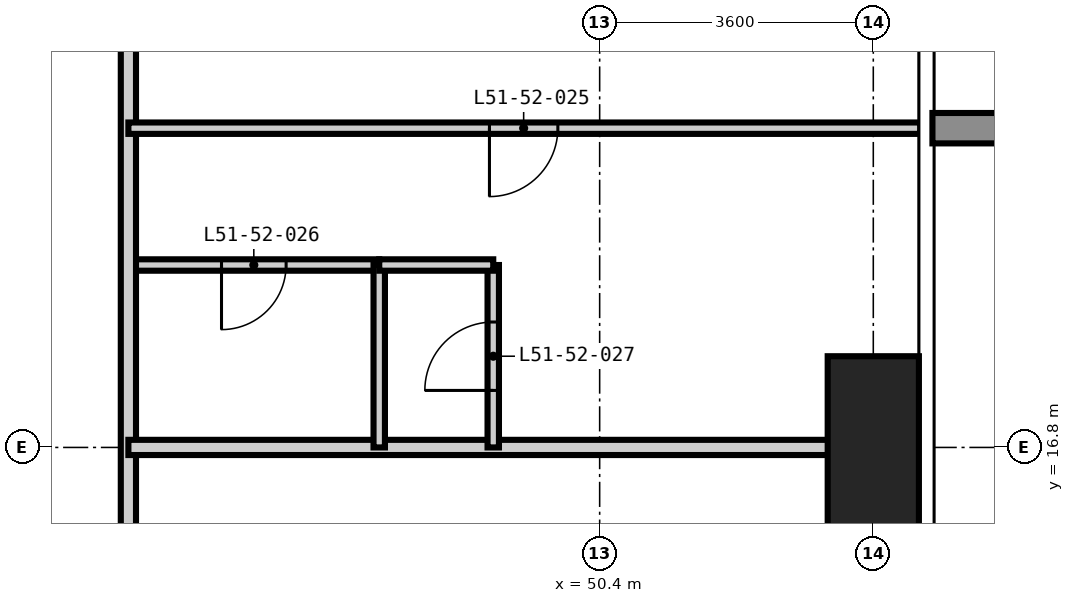
"""IFC4 building model, lengths in metres.
Left out: names, types, materials, properties, quantities, classifications, styles, units other than length and angle.
Written with IfcOpenShell. Run it as: python <this file> out.ifc"""

import sys

from ifc_helpers import new_model, si_unit, direction, frame, frame_2d, origin, origin_2d, place, context, subcontext, project, spatial, rectangle, extrude, element, fill, save


model = new_model("IFC4")
c1 = context("Model", 3, precision=1e-05, world=origin(), true_north=direction((0.0, 1.0)))
c2 = subcontext(c1, "Body", "Model", "MODEL_VIEW")
j1 = project(units=[si_unit("LENGTHUNIT", "METRE"), si_unit("PLANEANGLEUNIT", "RADIAN")], contexts=[c1])
p1 = place(None, origin())
s1 = spatial("IfcSite", under=j1, at=p1, CompositionType="ELEMENT")
p2 = place(p1, origin())
s2 = spatial("IfcBuilding", under=s1, at=p2, CompositionType="ELEMENT")
p3 = place(p2, frame((0.0, 0.0, 198.6)))
s3 = spatial("IfcBuildingStorey", under=s2, at=p3, CompositionType="ELEMENT", Elevation=198.6)
p4 = place(p3, frame((54.0, 16.8, -0.35), z_axis=(0.0, 0.0, 1.0), x_axis=(1.0, 0.0, 0.0)))
e1 = element("IfcColumn", 1, at=p4, inside=s3, PredefinedType="COLUMN", context=c2, shape_type="SweptSolid", body=[
    extrude(rectangle(XDim=1.2, YDim=2.4, at=origin_2d()), origin(), (0.0, 0.0, 1.0), 3.6),
])
p5 = place(p3, frame((44.2, 19.2, 0.0), z_axis=(0.0, 0.0, 1.0), x_axis=(1.0, 0.0, 0.0)))
e2 = element("IfcWall", 2, at=p5, inside=s3, PredefinedType="PARTITIONING", context=c2, shape_type="SweptSolid", body=[
    extrude(rectangle(XDim=3.3, YDim=0.15, at=frame_2d((1.65, 0.0))), origin(), (0.0, 0.0, 1.0), 3.25),
])
p6 = place(p5, frame((1.225, 0.0, 0.0)))
e3 = element("IfcOpeningElement", 3, at=p6, cuts=e2, PredefinedType="OPENING", context=c2, shape_type="SweptSolid", body=[
    extrude(rectangle(XDim=0.85, YDim=2.1, at=frame_2d((0.425, 1.05))), frame((0.0, 0.085, 0.0), z_axis=(0.0, -1.0, 0.0), x_axis=(1.0, 0.0, 0.0)), (0.0, 0.0, 1.0), 0.17),
])
p7 = place(p3, frame((44.2, 44.8, 0.0), z_axis=(0.0, 0.0, 1.0), x_axis=(0.0, -1.0, 0.0)))
e4 = element("IfcWall", 4, at=p7, inside=s3, PredefinedType="PARTITIONING", context=c2, shape_type="SweptSolid", body=[
    extrude(rectangle(XDim=31.4, YDim=0.2, at=frame_2d((15.7, 0.0))), origin(), (0.0, 0.0, 1.0), 3.25),
])
p8 = place(p7, frame((21.2, 0.0, 0.0)))
e5 = element("IfcOpeningElement", 5, at=p8, cuts=e4, PredefinedType="OPENING", context=c2, shape_type="SweptSolid", body=[
    extrude(rectangle(XDim=1.0, YDim=2.2, at=frame_2d((0.5, 1.1))), frame((0.0, 0.11, 0.0), z_axis=(0.0, -1.0, 0.0), x_axis=(1.0, 0.0, 0.0)), (0.0, 0.0, 1.0), 0.22),
])
p9 = place(p7, frame((8.6, 0.0, 0.0)))
e6 = element("IfcOpeningElement", 6, at=p9, cuts=e4, PredefinedType="OPENING", context=c2, shape_type="SweptSolid", body=[
    extrude(rectangle(XDim=1.0, YDim=2.2, at=frame_2d((0.5, 1.1))), frame((0.0, 0.11, 0.0), z_axis=(0.0, -1.0, 0.0), x_axis=(1.0, 0.0, 0.0)), (0.0, 0.0, 1.0), 0.22),
])
p10 = place(p7, frame((29.2, 0.0, 0.0)))
e7 = element("IfcOpeningElement", 7, at=p10, cuts=e4, PredefinedType="OPENING", context=c2, shape_type="SweptSolid", body=[
    extrude(rectangle(XDim=1.0, YDim=2.2, at=frame_2d((0.5, 1.1))), frame((0.0, 0.11, 0.0), z_axis=(0.0, -1.0, 0.0), x_axis=(1.0, 0.0, 0.0)), (0.0, 0.0, 1.0), 0.22),
])
p11 = place(p7, frame((0.9, 0.0, 0.0)))
e8 = element("IfcOpeningElement", 8, at=p11, cuts=e4, PredefinedType="OPENING", context=c2, shape_type="SweptSolid", body=[
    extrude(rectangle(XDim=1.0, YDim=2.2, at=frame_2d((0.5, 1.1))), frame((0.0, 0.11, 0.0), z_axis=(0.0, -1.0, 0.0), x_axis=(1.0, 0.0, 0.0)), (0.0, 0.0, 1.0), 0.22),
])
p12 = place(p3, frame((44.2, 16.8, 0.0), z_axis=(0.0, 0.0, 1.0), x_axis=(1.0, 0.0, 0.0)))
e9 = element("IfcWall", 9, at=p12, inside=s3, PredefinedType="PARTITIONING", context=c2, shape_type="SweptSolid", body=[
    extrude(rectangle(XDim=10.418, YDim=0.2, at=frame_2d((5.209, 0.0))), origin(), (0.0, 0.0, 1.0), 3.25),
])
p13 = place(p3, frame((47.5, 16.8, 0.0), z_axis=(0.0, 0.0, 1.0), x_axis=(0.0, 1.0, 0.0)))
e10 = element("IfcWall", 10, at=p13, inside=s3, PredefinedType="PARTITIONING", context=c2, shape_type="SweptSolid", body=[
    extrude(rectangle(XDim=2.4, YDim=0.15, at=frame_2d((1.2, 0.0))), origin(), (0.0, 0.0, 1.0), 3.25),
])
p14 = place(p3, frame((49.0, 16.8, 0.0), z_axis=(0.0, 0.0, 1.0), x_axis=(0.0, 1.0, 0.0)))
e11 = element("IfcWall", 11, at=p14, inside=s3, PredefinedType="PARTITIONING", context=c2, shape_type="SweptSolid", body=[
    extrude(rectangle(XDim=2.4, YDim=0.15, at=frame_2d((1.2, 0.0))), origin(), (0.0, 0.0, 1.0), 3.25),
])
p15 = place(p14, frame((0.75, 0.0, 0.0)))
e12 = element("IfcOpeningElement", 12, at=p15, cuts=e11, PredefinedType="OPENING", context=c2, shape_type="SweptSolid", body=[
    extrude(rectangle(XDim=0.9, YDim=2.1, at=frame_2d((0.45, 1.05))), frame((0.0, 0.085, 0.0), z_axis=(0.0, -1.0, 0.0), x_axis=(1.0, 0.0, 0.0)), (0.0, 0.0, 1.0), 0.17),
])
p16 = place(p3, frame((47.5, 19.2, 0.0), z_axis=(0.0, 0.0, 1.0), x_axis=(1.0, 0.0, 0.0)))
e13 = element("IfcWall", 13, at=p16, inside=s3, PredefinedType="PARTITIONING", context=c2, shape_type="SweptSolid", body=[
    extrude(rectangle(XDim=1.5, YDim=0.15, at=frame_2d((0.75, 0.0))), origin(), (0.0, 0.0, 1.0), 3.25),
])
p17 = place(p3, frame((44.2, 21.0, 0.0), z_axis=(0.0, 0.0, 1.0), x_axis=(1.0, 0.0, 0.0)))
e14 = element("IfcWall", 14, at=p17, inside=s3, PredefinedType="PARTITIONING", context=c2, shape_type="SweptSolid", body=[
    extrude(rectangle(XDim=10.418, YDim=0.15, at=frame_2d((5.209, 0.0))), origin(), (0.0, 0.0, 1.0), 3.25),
])
p18 = place(p17, frame((4.75, 0.0, 0.0)))
e15 = element("IfcOpeningElement", 15, at=p18, cuts=e14, PredefinedType="OPENING", context=c2, shape_type="SweptSolid", body=[
    extrude(rectangle(XDim=0.9, YDim=2.1, at=frame_2d((0.45, 1.05))), frame((0.0, 0.085, 0.0), z_axis=(0.0, -1.0, 0.0), x_axis=(1.0, 0.0, 0.0)), (0.0, 0.0, 1.0), 0.17),
])
p19 = place(p18, frame((0.9, 0.0, 0.0), z_axis=(0.0, 0.0, 1.0), x_axis=(-1.0, 0.0, 0.0)))
e16 = element("IfcDoor", 16, at=p19, inside=s3, OperationType="SINGLE_SWING_RIGHT", PredefinedType="DOOR", context=c2, shape_type="SweptSolid", body=[
    extrude(rectangle(XDim=0.9, YDim=2.1, at=frame_2d((0.45, 1.05))), frame((0.0, 0.025, 0.0), z_axis=(0.0, -1.0, 0.0), x_axis=(1.0, 0.0, 0.0)), (0.0, 0.0, 1.0), 0.05),
])
fill(e15, e16)
p20 = place(p6, frame((0.85, 0.0, 0.0), z_axis=(0.0, 0.0, 1.0), x_axis=(-1.0, 0.0, 0.0)))
e17 = element("IfcDoor", 17, at=p20, inside=s3, OperationType="SINGLE_SWING_RIGHT", PredefinedType="DOOR", context=c2, shape_type="SweptSolid", body=[
    extrude(rectangle(XDim=0.85, YDim=2.1, at=frame_2d((0.425, 1.05))), frame((0.0, 0.025, 0.0), z_axis=(0.0, -1.0, 0.0), x_axis=(1.0, 0.0, 0.0)), (0.0, 0.0, 1.0), 0.05),
])
fill(e3, e17)
p21 = place(p15, origin())
e18 = element("IfcDoor", 18, at=p21, inside=s3, OperationType="SINGLE_SWING_LEFT", PredefinedType="DOOR", context=c2, shape_type="SweptSolid", body=[
    extrude(rectangle(XDim=0.9, YDim=2.1, at=frame_2d((0.45, 1.05))), frame((0.0, 0.025, 0.0), z_axis=(0.0, -1.0, 0.0), x_axis=(1.0, 0.0, 0.0)), (0.0, 0.0, 1.0), 0.05),
])
fill(e12, e18)
save(model, sys.argv[1])
